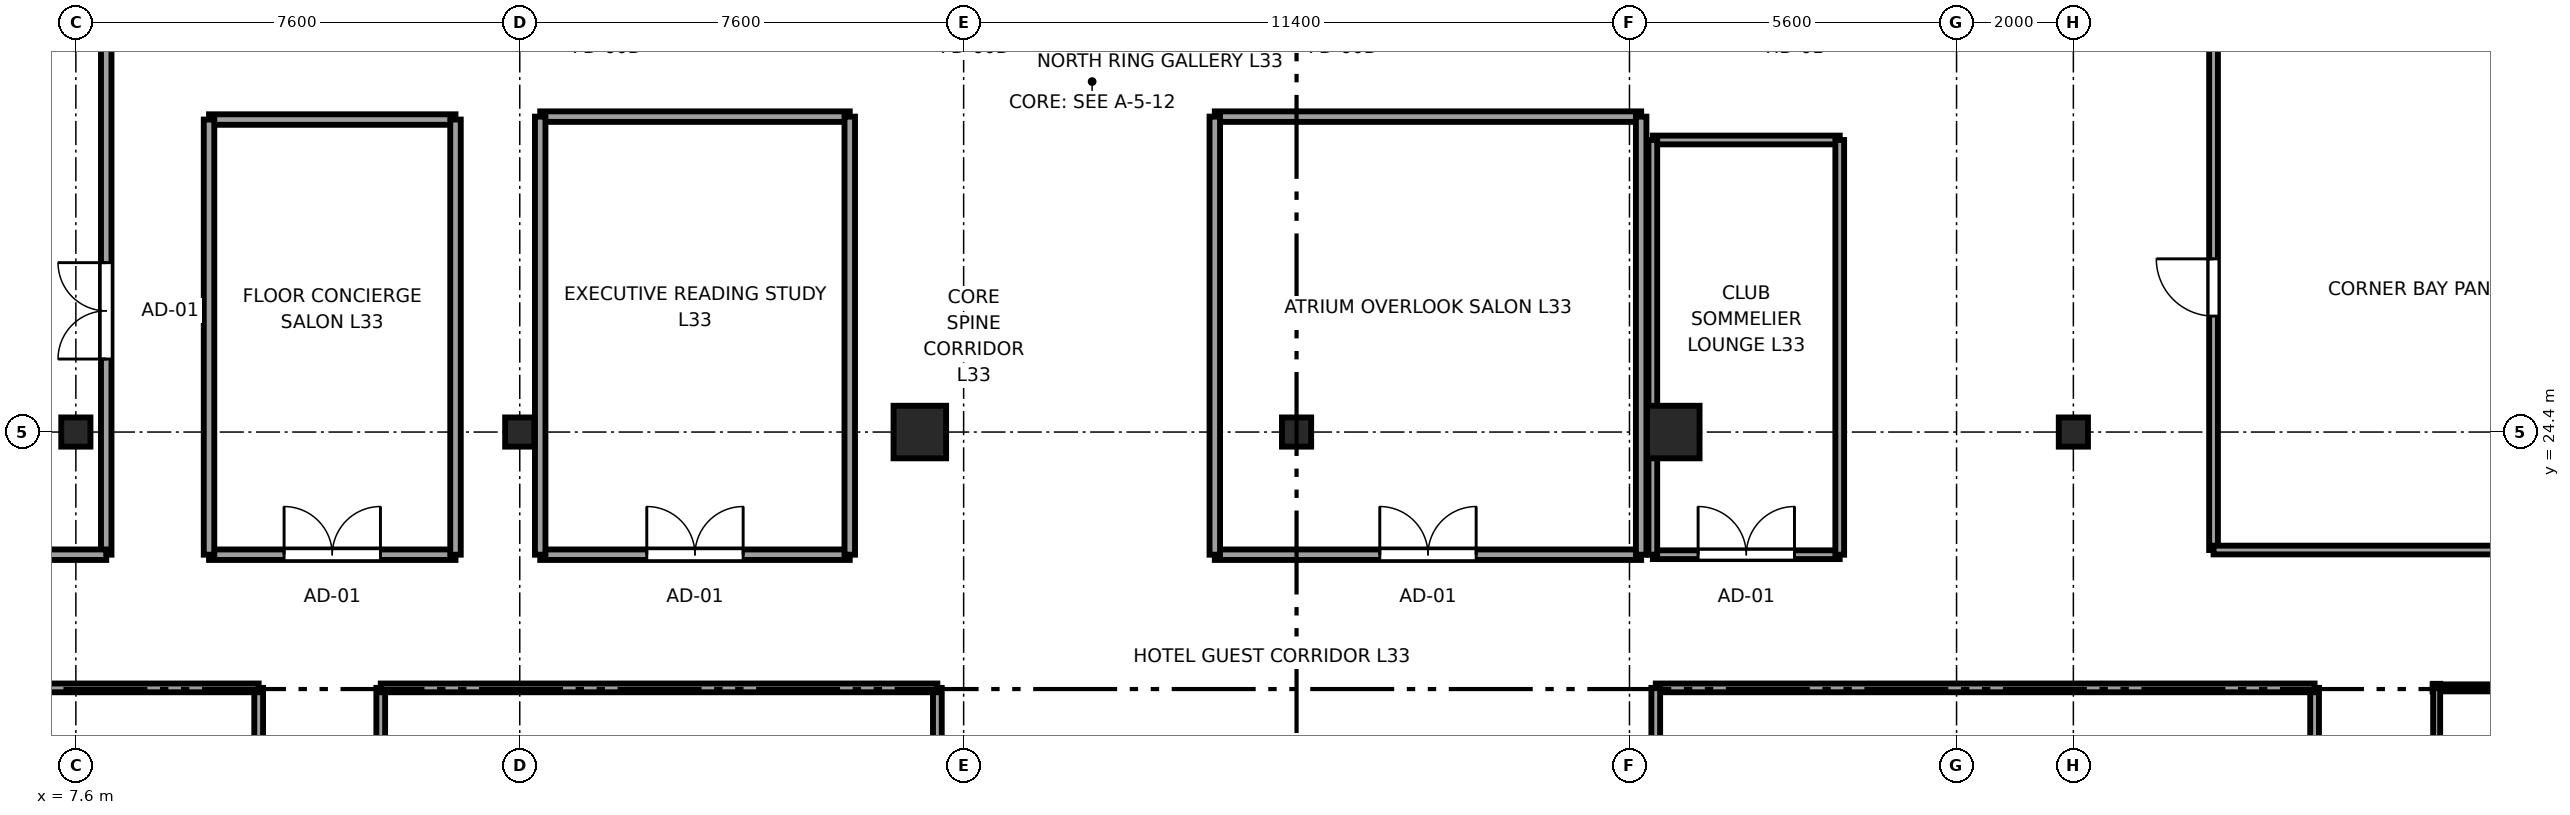
"""IFC4 building model, lengths in metres.
Left out: names, types, materials, properties, quantities, classifications, styles, units other than length and angle.
Written with IfcOpenShell. Run it as: python <this file> out.ifc"""

import sys

from ifc_helpers import new_model, si_unit, direction, frame, frame_2d, origin, origin_2d, place, context, subcontext, project, spatial, rectangle, i_section, extrude, source, transform, mapped, element, fill, save


model = new_model("IFC4")
c1 = context("Model", 3, precision=1e-05, world=origin(), true_north=direction((0.0, 1.0)))
c2 = subcontext(c1, "Body", "Model", "MODEL_VIEW")
j1 = project(units=[si_unit("LENGTHUNIT", "METRE"), si_unit("PLANEANGLEUNIT", "RADIAN")], contexts=[c1])
p1 = place(None, origin())
s1 = spatial("IfcSite", under=j1, at=p1, CompositionType="ELEMENT")
p2 = place(p1, origin())
s2 = spatial("IfcBuilding", under=s1, at=p2, CompositionType="ELEMENT")
p3 = place(p2, frame((0.0, 0.0, 129.3)))
s3 = spatial("IfcBuildingStorey", under=s2, at=p3, CompositionType="ELEMENT", Elevation=129.3)
m1 = source(origin(), c2, "Body", "SweptSolid", [
    extrude(i_section(OverallWidth=0.5, OverallDepth=0.5, WebThickness=0.022, FlangeThickness=0.034, at=origin_2d()), origin(), (0.0, 0.0, 1.0), 3.55),
])
for number, where, z_axis, x_axis in (
    (1, (7.6, 24.4, 0.0), (0.0, 0.0, 1.0), (1.0, 0.0, 0.0)),
    (2, (15.2, 24.4, 0.0), (0.0, 0.0, 1.0), (1.0, 0.0, 0.0)),
):
    element("IfcColumn", number, at=place(p3, frame(where, z_axis=z_axis, x_axis=x_axis)), inside=s3, PredefinedType="COLUMN", context=c2, shape_type="MappedRepresentation", body=[
        mapped(m1, transform((0.0, 0.0, 0.0), x_axis=(1.0, 0.0, 0.0), y_axis=(0.0, 1.0, 0.0), z_axis=(0.0, 0.0, 1.0), scale=1.0)),
    ])
m2 = source(origin(), c2, "Body", "SweptSolid", [
    extrude(rectangle(XDim=0.9, YDim=0.9, at=origin_2d()), origin(), (0.0, 0.0, 1.0), 3.55),
])
for number, where, z_axis, x_axis in (
    (3, (22.05, 24.4, 0.0), (0.0, 0.0, 1.0), (1.0, 0.0, 0.0)),
    (4, (34.95, 24.4, 0.0), (0.0, 0.0, 1.0), (1.0, 0.0, 0.0)),
):
    element("IfcColumn", number, at=place(p3, frame(where, z_axis=z_axis, x_axis=x_axis)), inside=s3, PredefinedType="COLUMN", context=c2, shape_type="MappedRepresentation", body=[
        mapped(m2, transform((0.0, 0.0, 0.0), x_axis=(1.0, 0.0, 0.0), y_axis=(0.0, 1.0, 0.0), z_axis=(0.0, 0.0, 1.0), scale=1.0)),
    ])
for number, where, z_axis, x_axis in (
    (5, (41.8, 24.4, 0.0), (0.0, 0.0, 1.0), (1.0, 0.0, 0.0)),
    (6, (28.5, 24.4, 0.0), (0.0, 0.0, 1.0), (1.0, 0.0, 0.0)),
):
    element("IfcColumn", number, at=place(p3, frame(where, z_axis=z_axis, x_axis=x_axis)), inside=s3, PredefinedType="COLUMN", context=c2, shape_type="MappedRepresentation", body=[
        mapped(m1, transform((0.0, 0.0, 0.0), x_axis=(1.0, 0.0, 0.0), y_axis=(0.0, 1.0, 0.0), z_axis=(0.0, 0.0, 1.0), scale=1.0)),
    ])
p4 = place(p3, frame((47.95, 20.02, 0.0), z_axis=(0.0, 0.0, 1.0), x_axis=(1.0, 0.0, 0.0)))
e7 = element("IfcWall", 7, at=p4, inside=s3, PredefinedType="PLUMBINGWALL", context=c2, shape_type="SweptSolid", body=[
    extrude(rectangle(XDim=2.59, YDim=0.12, at=frame_2d((1.295, 0.0))), origin(), (0.0, 0.0, 1.0), 3.37),
])
p5 = place(p3, frame((48.02, 17.997, 0.0), z_axis=(0.0, 0.0, 1.0), x_axis=(0.0, 1.0, 0.0)))
e8 = element("IfcWall", 8, at=p5, inside=s3, PredefinedType="PLUMBINGWALL", context=c2, shape_type="SweptSolid", body=[
    extrude(rectangle(XDim=2.093, YDim=0.12, at=frame_2d((1.046, 0.0))), origin(), (0.0, 0.0, 1.0), 3.37),
])
p6 = place(p3, frame((10.73, 17.037, 0.0), z_axis=(0.0, 0.0, 1.0), x_axis=(0.0, 1.0, 0.0)))
e9 = element("IfcWall", 9, at=p6, inside=s3, PredefinedType="PARTITIONING", context=c2, shape_type="SweptSolid", body=[
    extrude(rectangle(XDim=2.983, YDim=0.15, at=frame_2d((1.491, 0.0))), origin(), (0.0, 0.0, 1.0), 3.37),
])
p7 = place(p6, frame((0.981, 0.0, 0.0)))
e10 = element("IfcOpeningElement", 10, at=p7, cuts=e9, PredefinedType="OPENING", context=c2, shape_type="SweptSolid", body=[
    extrude(rectangle(XDim=0.98, YDim=2.12, at=frame_2d((0.49, 1.06))), frame((0.0, 0.085, 0.0), z_axis=(0.0, -1.0, 0.0), x_axis=(1.0, 0.0, 0.0)), (0.0, 0.0, 1.0), 0.17),
])
p8 = place(p3, frame((0.405, 20.02, 0.0), z_axis=(0.0, 0.0, 1.0), x_axis=(1.0, 0.0, 0.0)))
e11 = element("IfcWall", 11, at=p8, inside=s3, PredefinedType="PARTITIONING", context=c2, shape_type="SweptSolid", body=[
    extrude(rectangle(XDim=10.325, YDim=0.15, at=frame_2d((5.163, 0.0))), origin(), (0.0, 0.0, 1.0), 3.37),
])
p9 = place(p3, frame((12.82, 15.81, 0.0), z_axis=(0.0, 0.0, 1.0), x_axis=(0.0, 1.0, 0.0)))
e12 = element("IfcWall", 12, at=p9, inside=s3, PredefinedType="PARTITIONING", context=c2, shape_type="SweptSolid", body=[
    extrude(rectangle(XDim=4.21, YDim=0.15, at=frame_2d((2.105, 0.0))), origin(), (0.0, 0.0, 1.0), 3.37),
])
p10 = place(p9, frame((1.595, 0.0, 0.0)))
e13 = element("IfcOpeningElement", 13, at=p10, cuts=e12, PredefinedType="OPENING", context=c2, shape_type="SweptSolid", body=[
    extrude(rectangle(XDim=0.98, YDim=2.12, at=frame_2d((0.49, 1.06))), frame((0.0, 0.085, 0.0), z_axis=(0.0, -1.0, 0.0), x_axis=(1.0, 0.0, 0.0)), (0.0, 0.0, 1.0), 0.17),
])
p11 = place(p3, frame((22.35, 13.48, 0.0), z_axis=(0.0, 0.0, 1.0), x_axis=(0.0, 1.0, 0.0)))
e14 = element("IfcWall", 14, at=p11, inside=s3, PredefinedType="PARTITIONING", context=c2, shape_type="SweptSolid", body=[
    extrude(rectangle(XDim=6.54, YDim=0.15, at=frame_2d((3.27, 0.0))), origin(), (0.0, 0.0, 1.0), 3.37),
])
p12 = place(p3, frame((12.82, 20.02, 0.0), z_axis=(0.0, 0.0, 1.0), x_axis=(1.0, 0.0, 0.0)))
e15 = element("IfcWall", 15, at=p12, inside=s3, PredefinedType="PARTITIONING", context=c2, shape_type="SweptSolid", body=[
    extrude(rectangle(XDim=9.53, YDim=0.15, at=frame_2d((4.765, 0.0))), origin(), (0.0, 0.0, 1.0), 2.954),
])
p13 = place(p3, frame((45.93, 15.81, 0.0), z_axis=(0.0, 0.0, 1.0), x_axis=(0.0, 1.0, 0.0)))
e16 = element("IfcWall", 16, at=p13, inside=s3, PredefinedType="PARTITIONING", context=c2, shape_type="SweptSolid", body=[
    extrude(rectangle(XDim=4.21, YDim=0.15, at=frame_2d((2.105, 0.0))), origin(), (0.0, 0.0, 1.0), 3.37),
])
p14 = place(p13, frame((1.595, 0.0, 0.0)))
e17 = element("IfcOpeningElement", 17, at=p14, cuts=e16, PredefinedType="OPENING", context=c2, shape_type="SweptSolid", body=[
    extrude(rectangle(XDim=0.98, YDim=2.12, at=frame_2d((0.49, 1.06))), frame((0.0, 0.085, 0.0), z_axis=(0.0, -1.0, 0.0), x_axis=(1.0, 0.0, 0.0)), (0.0, 0.0, 1.0), 0.17),
])
p15 = place(p3, frame((34.65, 20.02, 0.0), z_axis=(0.0, 0.0, 1.0), x_axis=(1.0, 0.0, 0.0)))
e18 = element("IfcWall", 18, at=p15, inside=s3, PredefinedType="PARTITIONING", context=c2, shape_type="SweptSolid", body=[
    extrude(rectangle(XDim=11.28, YDim=0.15, at=frame_2d((5.64, 0.0))), origin(), (0.0, 0.0, 1.0), 2.954),
])
p16 = place(p3, frame((34.65, 13.48, 0.0), z_axis=(0.0, 0.0, 1.0), x_axis=(0.0, 1.0, 0.0)))
e19 = element("IfcWall", 19, at=p16, inside=s3, PredefinedType="PARTITIONING", context=c2, shape_type="SweptSolid", body=[
    extrude(rectangle(XDim=6.54, YDim=0.15, at=frame_2d((3.27, 0.0))), origin(), (0.0, 0.0, 1.0), 3.37),
])
p17 = place(p3, frame((8.12, 22.3, 0.0), z_axis=(0.0, 0.0, 1.0), x_axis=(0.0, 1.0, 0.0)))
e20 = element("IfcWall", 20, at=p17, inside=s3, PredefinedType="PARTITIONING", context=c2, shape_type="SweptSolid", body=[
    extrude(rectangle(XDim=13.5, YDim=0.18, at=frame_2d((6.75, 0.0))), origin(), (0.0, 0.0, 1.0), 3.37),
])
p18 = place(p17, frame((3.35, 0.0, 0.0)))
e21 = element("IfcOpeningElement", 21, at=p18, cuts=e20, PredefinedType="OPENING", context=c2, shape_type="SweptSolid", body=[
    extrude(rectangle(XDim=1.65, YDim=2.15, at=frame_2d((0.825, 1.075))), frame((0.0, 0.1, 0.0), z_axis=(0.0, -1.0, 0.0), x_axis=(1.0, 0.0, 0.0)), (0.0, 0.0, 1.0), 0.2),
])
p19 = place(p3, frame((0.405, 22.3, 0.0), z_axis=(0.0, 0.0, 1.0), x_axis=(1.0, 0.0, 0.0)))
e22 = element("IfcWall", 22, at=p19, inside=s3, PredefinedType="PARTITIONING", context=c2, shape_type="SweptSolid", body=[
    extrude(rectangle(XDim=7.715, YDim=0.18, at=frame_2d((3.857, 0.0))), origin(), (0.0, 0.0, 1.0), 3.37),
])
p20 = place(p3, frame((44.2, 22.38, 0.0), z_axis=(0.0, 0.0, 1.0), x_axis=(0.0, 1.0, 0.0)))
e23 = element("IfcWall", 23, at=p20, inside=s3, PredefinedType="PARTITIONING", context=c2, shape_type="SweptSolid", body=[
    extrude(rectangle(XDim=8.99, YDim=0.15, at=frame_2d((4.495, 0.0))), origin(), (0.0, 0.0, 1.0), 3.37),
])
p21 = place(p20, frame((4.005, 0.0, 0.0)))
e24 = element("IfcOpeningElement", 24, at=p21, cuts=e23, PredefinedType="OPENING", context=c2, shape_type="SweptSolid", body=[
    extrude(rectangle(XDim=0.98, YDim=2.12, at=frame_2d((0.49, 1.06))), frame((0.0, 0.085, 0.0), z_axis=(0.0, -1.0, 0.0), x_axis=(1.0, 0.0, 0.0)), (0.0, 0.0, 1.0), 0.17),
])
p22 = place(p3, frame((44.2, 22.38, 0.0), z_axis=(0.0, 0.0, 1.0), x_axis=(1.0, 0.0, 0.0)))
e25 = element("IfcWall", 25, at=p22, inside=s3, PredefinedType="PARTITIONING", context=c2, shape_type="SweptSolid", body=[
    extrude(rectangle(XDim=12.395, YDim=0.15, at=frame_2d((6.198, 0.0))), origin(), (0.0, 0.0, 1.0), 3.37),
])
p23 = place(p3, frame((9.88, 22.3, 0.0), z_axis=(0.0, 0.0, 1.0), x_axis=(1.0, 0.0, 0.0)))
e26 = element("IfcWall", 26, at=p23, inside=s3, PredefinedType="PARTITIONING", context=c2, shape_type="SweptSolid", body=[
    extrude(rectangle(XDim=4.22, YDim=0.18, at=frame_2d((2.11, 0.0))), origin(), (0.0, 0.0, 1.0), 3.37),
])
p24 = place(p23, frame((1.285, 0.0, 0.0)))
e27 = element("IfcOpeningElement", 27, at=p24, cuts=e26, PredefinedType="OPENING", context=c2, shape_type="SweptSolid", body=[
    extrude(rectangle(XDim=1.65, YDim=2.15, at=frame_2d((0.825, 1.075))), frame((0.0, 0.1, 0.0), z_axis=(0.0, -1.0, 0.0), x_axis=(1.0, 0.0, 0.0)), (0.0, 0.0, 1.0), 0.2),
])
p25 = place(p3, frame((9.88, 29.75, 0.0), z_axis=(0.0, 0.0, 1.0), x_axis=(1.0, 0.0, 0.0)))
e28 = element("IfcWall", 28, at=p25, inside=s3, PredefinedType="PARTITIONING", context=c2, shape_type="SweptSolid", body=[
    extrude(rectangle(XDim=4.22, YDim=0.18, at=frame_2d((2.11, 0.0))), origin(), (0.0, 0.0, 1.0), 3.37),
])
for number, where, z_axis, x_axis in (
    (29, (9.88, 22.3, 0.0), (0.0, 0.0, 1.0), (0.0, 1.0, 0.0)),
    (30, (14.1, 22.3, 0.0), (0.0, 0.0, 1.0), (0.0, 1.0, 0.0)),
):
    element("IfcWall", number, at=place(p3, frame(where, z_axis=z_axis, x_axis=x_axis)), inside=s3, PredefinedType="PARTITIONING", context=c2, shape_type="SweptSolid", body=[
        extrude(rectangle(XDim=7.45, YDim=0.18, at=frame_2d((3.725, 0.0))), origin(), (0.0, 0.0, 1.0), 3.37),
    ])
p26 = place(p3, frame((27.1, 22.3, 0.0), z_axis=(0.0, 0.0, 1.0), x_axis=(1.0, 0.0, 0.0)))
e31 = element("IfcWall", 31, at=p26, inside=s3, PredefinedType="PARTITIONING", context=c2, shape_type="SweptSolid", body=[
    extrude(rectangle(XDim=7.3, YDim=0.18, at=frame_2d((3.65, 0.0))), origin(), (0.0, 0.0, 1.0), 3.37),
])
p27 = place(p26, frame((2.825, 0.0, 0.0)))
e32 = element("IfcOpeningElement", 32, at=p27, cuts=e31, PredefinedType="OPENING", context=c2, shape_type="SweptSolid", body=[
    extrude(rectangle(XDim=1.65, YDim=2.15, at=frame_2d((0.825, 1.075))), frame((0.0, 0.1, 0.0), z_axis=(0.0, -1.0, 0.0), x_axis=(1.0, 0.0, 0.0)), (0.0, 0.0, 1.0), 0.2),
])
p28 = place(p3, frame((27.1, 29.8, 0.0), z_axis=(0.0, 0.0, 1.0), x_axis=(1.0, 0.0, 0.0)))
e33 = element("IfcWall", 33, at=p28, inside=s3, PredefinedType="PARTITIONING", context=c2, shape_type="SweptSolid", body=[
    extrude(rectangle(XDim=7.3, YDim=0.18, at=frame_2d((3.65, 0.0))), origin(), (0.0, 0.0, 1.0), 3.37),
])
for number, where, z_axis, x_axis in (
    (34, (27.1, 22.3, 0.0), (0.0, 0.0, 1.0), (0.0, 1.0, 0.0)),
    (35, (34.4, 22.3, 0.0), (0.0, 0.0, 1.0), (0.0, 1.0, 0.0)),
):
    element("IfcWall", number, at=place(p3, frame(where, z_axis=z_axis, x_axis=x_axis)), inside=s3, PredefinedType="PARTITIONING", context=c2, shape_type="SweptSolid", body=[
        extrude(rectangle(XDim=7.5, YDim=0.18, at=frame_2d((3.75, 0.0))), origin(), (0.0, 0.0, 1.0), 3.37),
    ])
p29 = place(p3, frame((15.55, 22.3, 0.0), z_axis=(0.0, 0.0, 1.0), x_axis=(1.0, 0.0, 0.0)))
e36 = element("IfcWall", 36, at=p29, inside=s3, PredefinedType="PARTITIONING", context=c2, shape_type="SweptSolid", body=[
    extrude(rectangle(XDim=5.3, YDim=0.18, at=frame_2d((2.65, 0.0))), origin(), (0.0, 0.0, 1.0), 3.37),
])
p30 = place(p29, frame((1.825, 0.0, 0.0)))
e37 = element("IfcOpeningElement", 37, at=p30, cuts=e36, PredefinedType="OPENING", context=c2, shape_type="SweptSolid", body=[
    extrude(rectangle(XDim=1.65, YDim=2.15, at=frame_2d((0.825, 1.075))), frame((0.0, 0.1, 0.0), z_axis=(0.0, -1.0, 0.0), x_axis=(1.0, 0.0, 0.0)), (0.0, 0.0, 1.0), 0.2),
])
p31 = place(p3, frame((15.55, 29.8, 0.0), z_axis=(0.0, 0.0, 1.0), x_axis=(1.0, 0.0, 0.0)))
e38 = element("IfcWall", 38, at=p31, inside=s3, PredefinedType="PARTITIONING", context=c2, shape_type="SweptSolid", body=[
    extrude(rectangle(XDim=5.3, YDim=0.18, at=frame_2d((2.65, 0.0))), origin(), (0.0, 0.0, 1.0), 3.37),
])
for number, where, z_axis, x_axis in (
    (39, (15.55, 22.3, 0.0), (0.0, 0.0, 1.0), (0.0, 1.0, 0.0)),
    (40, (20.85, 22.3, 0.0), (0.0, 0.0, 1.0), (0.0, 1.0, 0.0)),
):
    element("IfcWall", number, at=place(p3, frame(where, z_axis=z_axis, x_axis=x_axis)), inside=s3, PredefinedType="PARTITIONING", context=c2, shape_type="SweptSolid", body=[
        extrude(rectangle(XDim=7.5, YDim=0.18, at=frame_2d((3.75, 0.0))), origin(), (0.0, 0.0, 1.0), 3.37),
    ])
p32 = place(p3, frame((34.6, 22.3, 0.0), z_axis=(0.0, 0.0, 1.0), x_axis=(1.0, 0.0, 0.0)))
e41 = element("IfcWall", 41, at=p32, inside=s3, PredefinedType="PARTITIONING", context=c2, shape_type="SweptSolid", body=[
    extrude(rectangle(XDim=3.2, YDim=0.15, at=frame_2d((1.6, 0.0))), origin(), (0.0, 0.0, 1.0), 3.37),
])
p33 = place(p32, frame((0.775, 0.0, 0.0)))
e42 = element("IfcOpeningElement", 42, at=p33, cuts=e41, PredefinedType="OPENING", context=c2, shape_type="SweptSolid", body=[
    extrude(rectangle(XDim=1.65, YDim=2.15, at=frame_2d((0.825, 1.075))), frame((0.0, 0.085, 0.0), z_axis=(0.0, -1.0, 0.0), x_axis=(1.0, 0.0, 0.0)), (0.0, 0.0, 1.0), 0.17),
])
p34 = place(p3, frame((34.6, 29.4, 0.0), z_axis=(0.0, 0.0, 1.0), x_axis=(1.0, 0.0, 0.0)))
e43 = element("IfcWall", 43, at=p34, inside=s3, PredefinedType="PARTITIONING", context=c2, shape_type="SweptSolid", body=[
    extrude(rectangle(XDim=3.2, YDim=0.15, at=frame_2d((1.6, 0.0))), origin(), (0.0, 0.0, 1.0), 3.37),
])
for number, where, z_axis, x_axis in (
    (44, (34.6, 22.3, 0.0), (0.0, 0.0, 1.0), (0.0, 1.0, 0.0)),
    (45, (37.8, 22.3, 0.0), (0.0, 0.0, 1.0), (0.0, 1.0, 0.0)),
):
    element("IfcWall", number, at=place(p3, frame(where, z_axis=z_axis, x_axis=x_axis)), inside=s3, PredefinedType="PARTITIONING", context=c2, shape_type="SweptSolid", body=[
        extrude(rectangle(XDim=7.1, YDim=0.15, at=frame_2d((3.55, 0.0))), origin(), (0.0, 0.0, 1.0), 3.37),
    ])
m3 = source(origin(), c2, "Body", "SweptSolid", [
    extrude(rectangle(XDim=1.65, YDim=2.15, at=frame_2d((0.825, 1.075))), frame((0.0, 0.025, 0.0), z_axis=(0.0, -1.0, 0.0), x_axis=(1.0, 0.0, 0.0)), (0.0, 0.0, 1.0), 0.05),
])
p35 = place(p18, origin())
e46 = element("IfcDoor", 46, at=p35, inside=s3, OperationType="DOUBLE_DOOR_SINGLE_SWING", PredefinedType="DOOR", context=c2, shape_type="MappedRepresentation", body=[
    mapped(m3, transform((0.0, 0.0, 0.0), x_axis=(1.0, 0.0, 0.0), y_axis=(0.0, 1.0, 0.0), z_axis=(0.0, 0.0, 1.0), scale=1.0)),
])
fill(e21, e46)
m4 = source(origin(), c2, "Body", "SweptSolid", [
    extrude(rectangle(XDim=0.98, YDim=2.12, at=frame_2d((0.49, 1.06))), frame((0.0, 0.025, 0.0), z_axis=(0.0, -1.0, 0.0), x_axis=(1.0, 0.0, 0.0)), (0.0, 0.0, 1.0), 0.05),
])
p36 = place(p21, origin())
e47 = element("IfcDoor", 47, at=p36, inside=s3, OperationType="SINGLE_SWING_RIGHT", PredefinedType="DOOR", context=c2, shape_type="MappedRepresentation", body=[
    mapped(m4, transform((0.0, 0.0, 0.0), x_axis=(1.0, 0.0, 0.0), y_axis=(0.0, 1.0, 0.0), z_axis=(0.0, 0.0, 1.0), scale=1.0)),
])
fill(e24, e47)
p37 = place(p24, origin())
e48 = element("IfcDoor", 48, at=p37, inside=s3, OperationType="DOUBLE_DOOR_SINGLE_SWING", PredefinedType="DOOR", context=c2, shape_type="MappedRepresentation", body=[
    mapped(m3, transform((0.0, 0.0, 0.0), x_axis=(1.0, 0.0, 0.0), y_axis=(0.0, 1.0, 0.0), z_axis=(0.0, 0.0, 1.0), scale=1.0)),
])
fill(e27, e48)
p38 = place(p27, origin())
e49 = element("IfcDoor", 49, at=p38, inside=s3, OperationType="DOUBLE_DOOR_SINGLE_SWING", PredefinedType="DOOR", context=c2, shape_type="MappedRepresentation", body=[
    mapped(m3, transform((0.0, 0.0, 0.0), x_axis=(1.0, 0.0, 0.0), y_axis=(0.0, 1.0, 0.0), z_axis=(0.0, 0.0, 1.0), scale=1.0)),
])
fill(e32, e49)
p39 = place(p30, origin())
e50 = element("IfcDoor", 50, at=p39, inside=s3, OperationType="DOUBLE_DOOR_SINGLE_SWING", PredefinedType="DOOR", context=c2, shape_type="MappedRepresentation", body=[
    mapped(m3, transform((0.0, 0.0, 0.0), x_axis=(1.0, 0.0, 0.0), y_axis=(0.0, 1.0, 0.0), z_axis=(0.0, 0.0, 1.0), scale=1.0)),
])
fill(e37, e50)
p40 = place(p33, origin())
e51 = element("IfcDoor", 51, at=p40, inside=s3, OperationType="DOUBLE_DOOR_SINGLE_SWING", PredefinedType="DOOR", context=c2, shape_type="MappedRepresentation", body=[
    mapped(m3, transform((0.0, 0.0, 0.0), x_axis=(1.0, 0.0, 0.0), y_axis=(0.0, 1.0, 0.0), z_axis=(0.0, 0.0, 1.0), scale=1.0)),
])
fill(e42, e51)
save(model, sys.argv[1])
